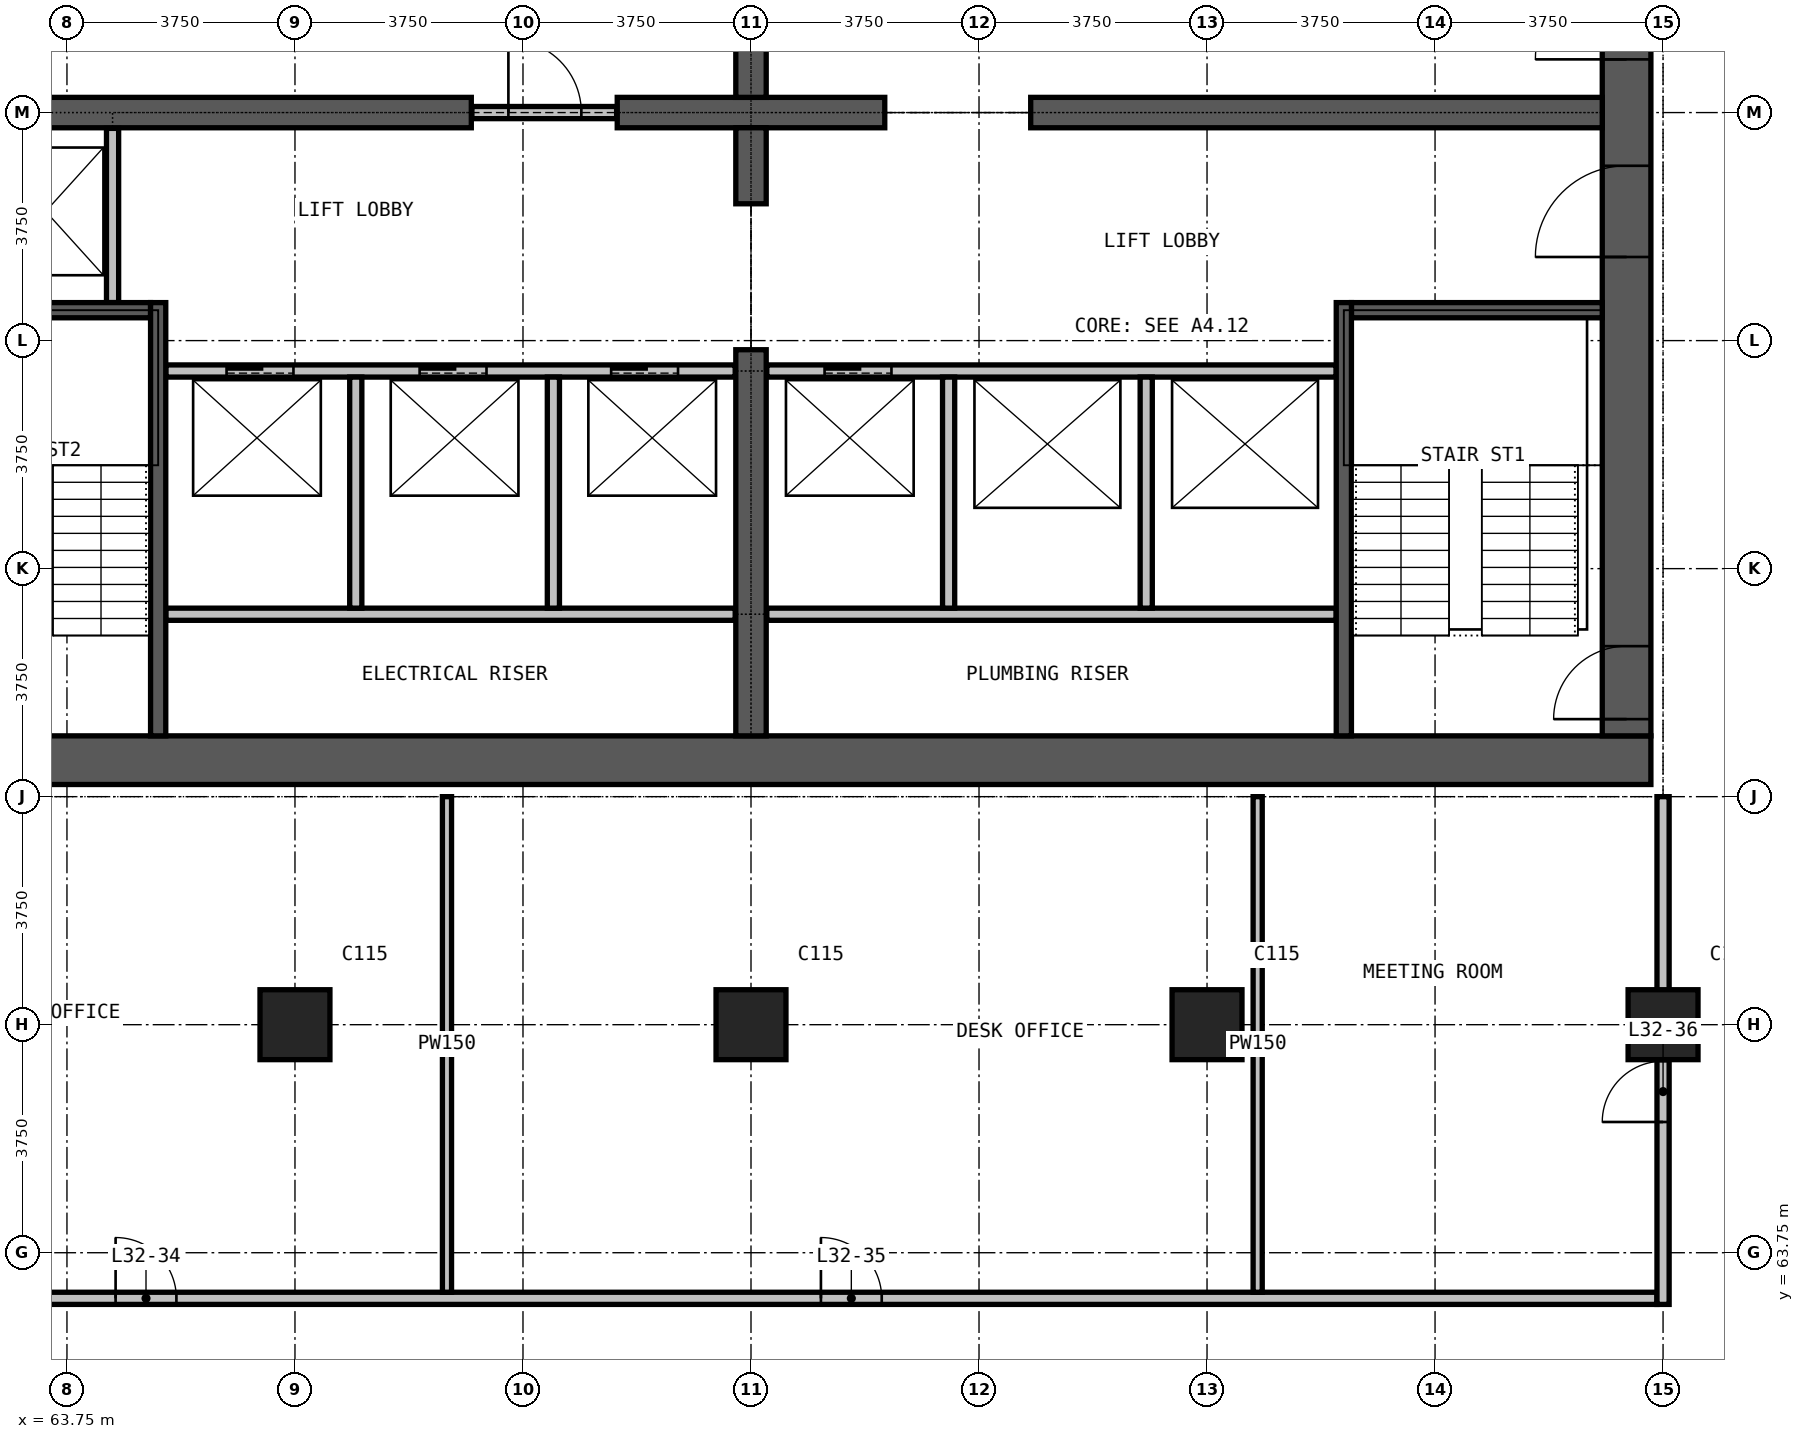
"""IFC4 building model, lengths in metres.
Left out: names, types, materials, properties, quantities, classifications, styles, units other than length and angle.
Written with IfcOpenShell. Run it as: python <this file> out.ifc"""

import sys

from ifc_helpers import new_model, si_unit, direction, frame, frame_2d, origin, origin_2d, place, context, subcontext, project, spatial, rectangle, extrude, element, fill, save


model = new_model("IFC4")
c1 = context("Model", 3, precision=1e-05, world=origin(), true_north=direction((0.0, 1.0)))
c2 = subcontext(c1, "Body", "Model", "MODEL_VIEW")
j1 = project(units=[si_unit("LENGTHUNIT", "METRE"), si_unit("PLANEANGLEUNIT", "RADIAN")], contexts=[c1])
p1 = place(None, origin())
s1 = spatial("IfcSite", under=j1, at=p1, CompositionType="ELEMENT")
p2 = place(p1, origin())
s2 = spatial("IfcBuilding", under=s1, at=p2, CompositionType="ELEMENT")
p3 = place(p2, frame((0.0, 0.0, 128.8)))
s3 = spatial("IfcBuildingStorey", under=s2, at=p3, CompositionType="ELEMENT", Elevation=128.8)
for number, where, z_axis, x_axis in (
    (1, (67.5, 67.5, 0.0), (0.0, 0.0, 1.0), (1.0, 0.0, 0.0)),
    (2, (75.0, 67.5, 0.0), (0.0, 0.0, 1.0), (1.0, 0.0, 0.0)),
    (3, (82.5, 67.5, 0.0), (0.0, 0.0, 1.0), (1.0, 0.0, 0.0)),
    (4, (90.0, 67.5, 0.0), (0.0, 0.0, 1.0), (1.0, 0.0, 0.0)),
):
    element("IfcColumn", number, at=place(p3, frame(where, z_axis=z_axis, x_axis=x_axis)), inside=s3, PredefinedType="COLUMN", context=c2, shape_type="SweptSolid", body=[
        extrude(rectangle(XDim=1.15, YDim=1.15, at=origin_2d()), origin(), (0.0, 0.0, 1.0), 3.6),
    ])
p4 = place(p3, frame((60.2, 71.85, 0.0), z_axis=(0.0, 0.0, 1.0), x_axis=(1.0, 0.0, 0.0)))
e5 = element("IfcWall", 5, at=p4, inside=s3, PredefinedType="SHEAR", context=c2, shape_type="SweptSolid", body=[
    extrude(rectangle(XDim=29.6, YDim=0.8, at=frame_2d((14.8, 0.0))), origin(), (0.0, 0.0, 1.0), 3.6),
])
p5 = place(p3, frame((89.4, 72.25, 0.0), z_axis=(0.0, 0.0, 1.0), x_axis=(0.0, 1.0, 0.0)))
e6 = element("IfcWall", 6, at=p5, inside=s3, PredefinedType="SHEAR", context=c2, shape_type="SweptSolid", body=[
    extrude(rectangle(XDim=20.5, YDim=0.8, at=frame_2d((10.25, 0.0))), origin(), (0.0, 0.0, 1.0), 3.6),
])
p6 = place(p5, frame((0.275, 0.0, 0.0)))
e7 = element("IfcOpeningElement", 7, at=p6, cuts=e6, PredefinedType="OPENING", context=c2, shape_type="SweptSolid", body=[
    extrude(rectangle(XDim=1.2, YDim=2.2, at=frame_2d((0.6, 1.1))), frame((0.0, 0.41, 0.0), z_axis=(0.0, -1.0, 0.0), x_axis=(1.0, 0.0, 0.0)), (0.0, 0.0, 1.0), 0.82),
])
p7 = place(p5, frame((13.775, 0.0, 0.0)))
e8 = element("IfcOpeningElement", 8, at=p7, cuts=e6, PredefinedType="OPENING", context=c2, shape_type="SweptSolid", body=[
    extrude(rectangle(XDim=1.2, YDim=2.2, at=frame_2d((0.6, 1.1))), frame((0.0, 0.41, 0.0), z_axis=(0.0, -1.0, 0.0), x_axis=(1.0, 0.0, 0.0)), (0.0, 0.0, 1.0), 0.82),
])
p8 = place(p5, frame((7.875, 0.0, 0.0)))
e9 = element("IfcOpeningElement", 9, at=p8, cuts=e6, PredefinedType="OPENING", context=c2, shape_type="SweptSolid", body=[
    extrude(rectangle(XDim=1.5, YDim=2.2, at=frame_2d((0.75, 1.1))), frame((0.0, 0.41, 0.0), z_axis=(0.0, -1.0, 0.0), x_axis=(1.0, 0.0, 0.0)), (0.0, 0.0, 1.0), 0.82),
])
p9 = place(p5, frame((11.125, 0.0, 0.0)))
e10 = element("IfcOpeningElement", 10, at=p9, cuts=e6, PredefinedType="OPENING", context=c2, shape_type="SweptSolid", body=[
    extrude(rectangle(XDim=1.5, YDim=2.2, at=frame_2d((0.75, 1.1))), frame((0.0, 0.41, 0.0), z_axis=(0.0, -1.0, 0.0), x_axis=(1.0, 0.0, 0.0)), (0.0, 0.0, 1.0), 0.82),
])
p10 = place(p3, frame((61.0, 82.5, 0.0), z_axis=(0.0, 0.0, 1.0), x_axis=(1.0, 0.0, 0.0)))
e11 = element("IfcWall", 11, at=p10, inside=s3, PredefinedType="SHEAR", context=c2, shape_type="SweptSolid", body=[
    extrude(rectangle(XDim=9.4, YDim=0.5, at=frame_2d((4.7, 0.0))), origin(), (0.0, 0.0, 1.0), 3.6),
])
p11 = place(p3, frame((72.8, 82.5, 0.0), z_axis=(0.0, 0.0, 1.0), x_axis=(1.0, 0.0, 0.0)))
e12 = element("IfcWall", 12, at=p11, inside=s3, PredefinedType="SHEAR", context=c2, shape_type="SweptSolid", body=[
    extrude(rectangle(XDim=4.4, YDim=0.5, at=frame_2d((2.2, 0.0))), origin(), (0.0, 0.0, 1.0), 3.6),
])
p12 = place(p3, frame((79.6, 82.5, 0.0), z_axis=(0.0, 0.0, 1.0), x_axis=(1.0, 0.0, 0.0)))
e13 = element("IfcWall", 13, at=p12, inside=s3, PredefinedType="SHEAR", context=c2, shape_type="SweptSolid", body=[
    extrude(rectangle(XDim=9.4, YDim=0.5, at=frame_2d((4.7, 0.0))), origin(), (0.0, 0.0, 1.0), 3.6),
])
p13 = place(p3, frame((75.0, 72.25, 0.0), z_axis=(0.0, 0.0, 1.0), x_axis=(0.0, 1.0, 0.0)))
e14 = element("IfcWall", 14, at=p13, inside=s3, PredefinedType="SHEAR", context=c2, shape_type="SweptSolid", body=[
    extrude(rectangle(XDim=6.35, YDim=0.5, at=frame_2d((3.175, 0.0))), origin(), (0.0, 0.0, 1.0), 3.6),
])
for number, where, z_axis, x_axis in (
    (15, (75.0, 81.0, 0.0), (0.0, 0.0, 1.0), (0.0, 1.0, 0.0)),
    (16, (75.0, 82.75, 0.0), (0.0, 0.0, 1.0), (0.0, 1.0, 0.0)),
):
    element("IfcWall", number, at=place(p3, frame(where, z_axis=z_axis, x_axis=x_axis)), inside=s3, PredefinedType="SHEAR", context=c2, shape_type="SweptSolid", body=[
        extrude(rectangle(XDim=1.25, YDim=0.5, at=frame_2d((0.625, 0.0))), origin(), (0.0, 0.0, 1.0), 3.6),
    ])
p14 = place(p3, frame((70.41, 82.5, 0.0), z_axis=(0.0, 0.0, 1.0), x_axis=(1.0, 0.0, 0.0)))
e17 = element("IfcWall", 17, at=p14, inside=s3, PredefinedType="PARTITIONING", context=c2, shape_type="SweptSolid", body=[
    extrude(rectangle(XDim=2.38, YDim=0.2, at=frame_2d((1.19, 0.0))), origin(), (0.0, 0.0, 1.0), 2.4),
])
p15 = place(p14, frame((0.6, 0.0, 0.0)))
e18 = element("IfcOpeningElement", 18, at=p15, cuts=e17, PredefinedType="OPENING", context=c2, shape_type="SweptSolid", body=[
    extrude(rectangle(XDim=1.2, YDim=2.2, at=frame_2d((0.6, 1.1))), frame((0.0, 0.11, 0.0), z_axis=(0.0, -1.0, 0.0), x_axis=(1.0, 0.0, 0.0)), (0.0, 0.0, 1.0), 0.22),
])
p16 = place(p3, frame((60.1, 63.0, 0.0), z_axis=(0.0, 0.0, 1.0), x_axis=(1.0, 0.0, 0.0)))
e19 = element("IfcWall", 19, at=p16, inside=s3, PredefinedType="PARTITIONING", context=c2, shape_type="SweptSolid", body=[
    extrude(rectangle(XDim=29.8, YDim=0.2, at=frame_2d((14.9, 0.0))), origin(), (0.0, 0.0, 1.0), 3.3),
])
p17 = place(p16, frame((4.45, 0.0, 0.0)))
e20 = element("IfcOpeningElement", 20, at=p17, cuts=e19, PredefinedType="OPENING", context=c2, shape_type="SweptSolid", body=[
    extrude(rectangle(XDim=1.0, YDim=2.2, at=frame_2d((0.5, 1.1))), frame((0.0, 0.11, 0.0), z_axis=(0.0, -1.0, 0.0), x_axis=(1.0, 0.0, 0.0)), (0.0, 0.0, 1.0), 0.22),
])
p18 = place(p16, frame((16.05, 0.0, 0.0)))
e21 = element("IfcOpeningElement", 21, at=p18, cuts=e19, PredefinedType="OPENING", context=c2, shape_type="SweptSolid", body=[
    extrude(rectangle(XDim=1.0, YDim=2.2, at=frame_2d((0.5, 1.1))), frame((0.0, 0.11, 0.0), z_axis=(0.0, -1.0, 0.0), x_axis=(1.0, 0.0, 0.0)), (0.0, 0.0, 1.0), 0.22),
])
p19 = place(p3, frame((90.0, 62.9, 0.0), z_axis=(0.0, 0.0, 1.0), x_axis=(0.0, 1.0, 0.0)))
e22 = element("IfcWall", 22, at=p19, inside=s3, PredefinedType="PARTITIONING", context=c2, shape_type="SweptSolid", body=[
    extrude(rectangle(XDim=8.35, YDim=0.2, at=frame_2d((4.175, 0.0))), origin(), (0.0, 0.0, 1.0), 3.3),
])
p20 = place(p19, frame((3.0, 0.0, 0.0)))
e23 = element("IfcOpeningElement", 23, at=p20, cuts=e22, PredefinedType="OPENING", context=c2, shape_type="SweptSolid", body=[
    extrude(rectangle(XDim=1.0, YDim=2.2, at=frame_2d((0.5, 1.1))), frame((0.0, 0.11, 0.0), z_axis=(0.0, -1.0, 0.0), x_axis=(1.0, 0.0, 0.0)), (0.0, 0.0, 1.0), 0.22),
])
for number, where, z_axis, x_axis in (
    (24, (70.0, 63.1, 0.0), (0.0, 0.0, 1.0), (0.0, 1.0, 0.0)),
    (25, (83.333, 63.1, 0.0), (0.0, 0.0, 1.0), (0.0, 1.0, 0.0)),
):
    element("IfcWall", number, at=place(p3, frame(where, z_axis=z_axis, x_axis=x_axis)), inside=s3, PredefinedType="PARTITIONING", context=c2, shape_type="SweptSolid", body=[
        extrude(rectangle(XDim=8.15, YDim=0.15, at=frame_2d((4.075, 0.0))), origin(), (0.0, 0.0, 1.0), 3.3),
    ])
for number, where, z_axis, x_axis in (
    (26, (65.375, 74.25, 0.0), (0.0, 0.0, 1.0), (1.0, 0.0, 0.0)),
    (27, (75.26, 74.25, 0.0), (0.0, 0.0, 1.0), (1.0, 0.0, 0.0)),
):
    element("IfcWall", number, at=place(p3, frame(where, z_axis=z_axis, x_axis=x_axis)), inside=s3, PredefinedType="PARTITIONING", context=c2, shape_type="SweptSolid", body=[
        extrude(rectangle(XDim=9.365, YDim=0.2, at=frame_2d((4.683, 0.0))), origin(), (0.0, 0.0, 1.0), 3.3),
    ])
p21 = place(p3, frame((65.375, 78.25, 0.0), z_axis=(0.0, 0.0, 1.0), x_axis=(1.0, 0.0, 0.0)))
e28 = element("IfcWall", 28, at=p21, inside=s3, PredefinedType="PARTITIONING", context=c2, shape_type="SweptSolid", body=[
    extrude(rectangle(XDim=9.365, YDim=0.2, at=frame_2d((4.683, 0.0))), origin(), (0.0, 0.0, 1.0), 3.3),
])
p22 = place(p21, frame((1.0, 0.0, 0.0)))
e29 = element("IfcOpeningElement", 29, at=p22, cuts=e28, PredefinedType="OPENING", context=c2, shape_type="SweptSolid", body=[
    extrude(rectangle(XDim=1.1, YDim=2.2, at=frame_2d((0.55, 1.1))), frame((0.0, 0.11, 0.0), z_axis=(0.0, -1.0, 0.0), x_axis=(1.0, 0.0, 0.0)), (0.0, 0.0, 1.0), 0.22),
])
p23 = place(p21, frame((4.175, 0.0, 0.0)))
e30 = element("IfcOpeningElement", 30, at=p23, cuts=e28, PredefinedType="OPENING", context=c2, shape_type="SweptSolid", body=[
    extrude(rectangle(XDim=1.1, YDim=2.2, at=frame_2d((0.55, 1.1))), frame((0.0, 0.11, 0.0), z_axis=(0.0, -1.0, 0.0), x_axis=(1.0, 0.0, 0.0)), (0.0, 0.0, 1.0), 0.22),
])
p24 = place(p21, frame((7.325, 0.0, 0.0)))
e31 = element("IfcOpeningElement", 31, at=p24, cuts=e28, PredefinedType="OPENING", context=c2, shape_type="SweptSolid", body=[
    extrude(rectangle(XDim=1.1, YDim=2.2, at=frame_2d((0.55, 1.1))), frame((0.0, 0.11, 0.0), z_axis=(0.0, -1.0, 0.0), x_axis=(1.0, 0.0, 0.0)), (0.0, 0.0, 1.0), 0.22),
])
p25 = place(p3, frame((75.26, 78.25, 0.0), z_axis=(0.0, 0.0, 1.0), x_axis=(1.0, 0.0, 0.0)))
e32 = element("IfcWall", 32, at=p25, inside=s3, PredefinedType="PARTITIONING", context=c2, shape_type="SweptSolid", body=[
    extrude(rectangle(XDim=9.365, YDim=0.2, at=frame_2d((4.683, 0.0))), origin(), (0.0, 0.0, 1.0), 3.3),
])
p26 = place(p25, frame((0.95, 0.0, 0.0)))
e33 = element("IfcOpeningElement", 33, at=p26, cuts=e32, PredefinedType="OPENING", context=c2, shape_type="SweptSolid", body=[
    extrude(rectangle(XDim=1.1, YDim=2.2, at=frame_2d((0.55, 1.1))), frame((0.0, 0.11, 0.0), z_axis=(0.0, -1.0, 0.0), x_axis=(1.0, 0.0, 0.0)), (0.0, 0.0, 1.0), 0.22),
])
p27 = place(p3, frame((64.5, 79.375, 0.0), z_axis=(0.0, 0.0, 1.0), x_axis=(0.0, 1.0, 0.0)))
e34 = element("IfcWall", 34, at=p27, inside=s3, PredefinedType="PARTITIONING", context=c2, shape_type="SweptSolid", body=[
    extrude(rectangle(XDim=2.865, YDim=0.2, at=frame_2d((1.433, 0.0))), origin(), (0.0, 0.0, 1.0), 3.3),
])
for number, where, z_axis, x_axis in (
    (35, (68.5, 74.35, 0.0), (0.0, 0.0, 1.0), (0.0, 1.0, 0.0)),
    (36, (71.75, 74.35, 0.0), (0.0, 0.0, 1.0), (0.0, 1.0, 0.0)),
    (37, (78.25, 74.35, 0.0), (0.0, 0.0, 1.0), (0.0, 1.0, 0.0)),
    (38, (81.5, 74.35, 0.0), (0.0, 0.0, 1.0), (0.0, 1.0, 0.0)),
):
    element("IfcWall", number, at=place(p3, frame(where, z_axis=z_axis, x_axis=x_axis)), inside=s3, PredefinedType="PARTITIONING", context=c2, shape_type="SweptSolid", body=[
        extrude(rectangle(XDim=3.8, YDim=0.2, at=frame_2d((1.9, 0.0))), origin(), (0.0, 0.0, 1.0), 3.3),
    ])
p28 = place(p3, frame((61.01, 79.25, 0.0), z_axis=(0.0, 0.0, 1.0), x_axis=(1.0, 0.0, 0.0)))
e39 = element("IfcWall", 39, at=p28, inside=s3, PredefinedType="PARTITIONING", context=c2, shape_type="SweptSolid", body=[
    extrude(rectangle(XDim=4.115, YDim=0.25, at=frame_2d((2.058, 0.0))), origin(), (0.0, 0.0, 1.0), 3.3),
])
p29 = place(p3, frame((84.875, 79.25, 0.0), z_axis=(0.0, 0.0, 1.0), x_axis=(1.0, 0.0, 0.0)))
e40 = element("IfcWall", 40, at=p29, inside=s3, PredefinedType="PARTITIONING", context=c2, shape_type="SweptSolid", body=[
    extrude(rectangle(XDim=4.125, YDim=0.25, at=frame_2d((2.062, 0.0))), origin(), (0.0, 0.0, 1.0), 3.3),
])
for number, where, z_axis, x_axis in (
    (41, (65.25, 72.25, 0.0), (0.0, 0.0, 1.0), (0.0, 1.0, 0.0)),
    (42, (84.75, 72.25, 0.0), (0.0, 0.0, 1.0), (0.0, 1.0, 0.0)),
):
    element("IfcWall", number, at=place(p3, frame(where, z_axis=z_axis, x_axis=x_axis)), inside=s3, PredefinedType="PARTITIONING", context=c2, shape_type="SweptSolid", body=[
        extrude(rectangle(XDim=7.125, YDim=0.25, at=frame_2d((3.562, 0.0))), origin(), (0.0, 0.0, 1.0), 3.3),
    ])
p30 = place(p22, origin())
e43 = element("IfcDoor", 43, at=p30, inside=s3, OperationType="DOUBLE_DOOR_SLIDING", PredefinedType="DOOR", context=c2, shape_type="SweptSolid", body=[
    extrude(rectangle(XDim=1.1, YDim=2.2, at=frame_2d((0.55, 1.1))), frame((0.0, 0.025, 0.0), z_axis=(0.0, -1.0, 0.0), x_axis=(1.0, 0.0, 0.0)), (0.0, 0.0, 1.0), 0.05),
])
fill(e29, e43)
p31 = place(p23, origin())
e44 = element("IfcDoor", 44, at=p31, inside=s3, OperationType="DOUBLE_DOOR_SLIDING", PredefinedType="DOOR", context=c2, shape_type="SweptSolid", body=[
    extrude(rectangle(XDim=1.1, YDim=2.2, at=frame_2d((0.55, 1.1))), frame((0.0, 0.025, 0.0), z_axis=(0.0, -1.0, 0.0), x_axis=(1.0, 0.0, 0.0)), (0.0, 0.0, 1.0), 0.05),
])
fill(e30, e44)
p32 = place(p24, origin())
e45 = element("IfcDoor", 45, at=p32, inside=s3, OperationType="DOUBLE_DOOR_SLIDING", PredefinedType="DOOR", context=c2, shape_type="SweptSolid", body=[
    extrude(rectangle(XDim=1.1, YDim=2.2, at=frame_2d((0.55, 1.1))), frame((0.0, 0.025, 0.0), z_axis=(0.0, -1.0, 0.0), x_axis=(1.0, 0.0, 0.0)), (0.0, 0.0, 1.0), 0.05),
])
fill(e31, e45)
p33 = place(p26, origin())
e46 = element("IfcDoor", 46, at=p33, inside=s3, OperationType="DOUBLE_DOOR_SLIDING", PredefinedType="DOOR", context=c2, shape_type="SweptSolid", body=[
    extrude(rectangle(XDim=1.1, YDim=2.2, at=frame_2d((0.55, 1.1))), frame((0.0, 0.025, 0.0), z_axis=(0.0, -1.0, 0.0), x_axis=(1.0, 0.0, 0.0)), (0.0, 0.0, 1.0), 0.05),
])
fill(e33, e46)
p34 = place(p15, origin())
e47 = element("IfcDoor", 47, at=p34, inside=s3, OperationType="SINGLE_SWING_LEFT", PredefinedType="DOOR", context=c2, shape_type="SweptSolid", body=[
    extrude(rectangle(XDim=1.2, YDim=2.2, at=frame_2d((0.6, 1.1))), frame((0.0, 0.025, 0.0), z_axis=(0.0, -1.0, 0.0), x_axis=(1.0, 0.0, 0.0)), (0.0, 0.0, 1.0), 0.05),
])
fill(e18, e47)
p35 = place(p6, origin())
e48 = element("IfcDoor", 48, at=p35, inside=s3, OperationType="SINGLE_SWING_RIGHT", PredefinedType="DOOR", context=c2, shape_type="SweptSolid", body=[
    extrude(rectangle(XDim=1.2, YDim=2.2, at=frame_2d((0.6, 1.1))), frame((0.0, 0.025, 0.0), z_axis=(0.0, -1.0, 0.0), x_axis=(1.0, 0.0, 0.0)), (0.0, 0.0, 1.0), 0.05),
])
fill(e7, e48)
p36 = place(p8, origin())
e49 = element("IfcDoor", 49, at=p36, inside=s3, OperationType="DOUBLE_DOOR_SINGLE_SWING", PredefinedType="DOOR", context=c2, shape_type="SweptSolid", body=[
    extrude(rectangle(XDim=1.5, YDim=2.2, at=frame_2d((0.75, 1.1))), frame((0.0, 0.025, 0.0), z_axis=(0.0, -1.0, 0.0), x_axis=(1.0, 0.0, 0.0)), (0.0, 0.0, 1.0), 0.05),
])
fill(e9, e49)
p37 = place(p9, origin())
e50 = element("IfcDoor", 50, at=p37, inside=s3, OperationType="DOUBLE_DOOR_SINGLE_SWING", PredefinedType="DOOR", context=c2, shape_type="SweptSolid", body=[
    extrude(rectangle(XDim=1.5, YDim=2.2, at=frame_2d((0.75, 1.1))), frame((0.0, 0.025, 0.0), z_axis=(0.0, -1.0, 0.0), x_axis=(1.0, 0.0, 0.0)), (0.0, 0.0, 1.0), 0.05),
])
fill(e10, e50)
p38 = place(p17, origin())
e51 = element("IfcDoor", 51, at=p38, inside=s3, OperationType="SINGLE_SWING_LEFT", PredefinedType="DOOR", context=c2, shape_type="SweptSolid", body=[
    extrude(rectangle(XDim=1.0, YDim=2.2, at=frame_2d((0.5, 1.1))), frame((0.0, 0.025, 0.0), z_axis=(0.0, -1.0, 0.0), x_axis=(1.0, 0.0, 0.0)), (0.0, 0.0, 1.0), 0.05),
])
fill(e20, e51)
p39 = place(p18, origin())
e52 = element("IfcDoor", 52, at=p39, inside=s3, OperationType="SINGLE_SWING_LEFT", PredefinedType="DOOR", context=c2, shape_type="SweptSolid", body=[
    extrude(rectangle(XDim=1.0, YDim=2.2, at=frame_2d((0.5, 1.1))), frame((0.0, 0.025, 0.0), z_axis=(0.0, -1.0, 0.0), x_axis=(1.0, 0.0, 0.0)), (0.0, 0.0, 1.0), 0.05),
])
fill(e21, e52)
p40 = place(p20, origin())
e53 = element("IfcDoor", 53, at=p40, inside=s3, OperationType="SINGLE_SWING_RIGHT", PredefinedType="DOOR", context=c2, shape_type="SweptSolid", body=[
    extrude(rectangle(XDim=1.0, YDim=2.2, at=frame_2d((0.5, 1.1))), frame((0.0, 0.025, 0.0), z_axis=(0.0, -1.0, 0.0), x_axis=(1.0, 0.0, 0.0)), (0.0, 0.0, 1.0), 0.05),
])
fill(e23, e53)
save(model, sys.argv[1])
